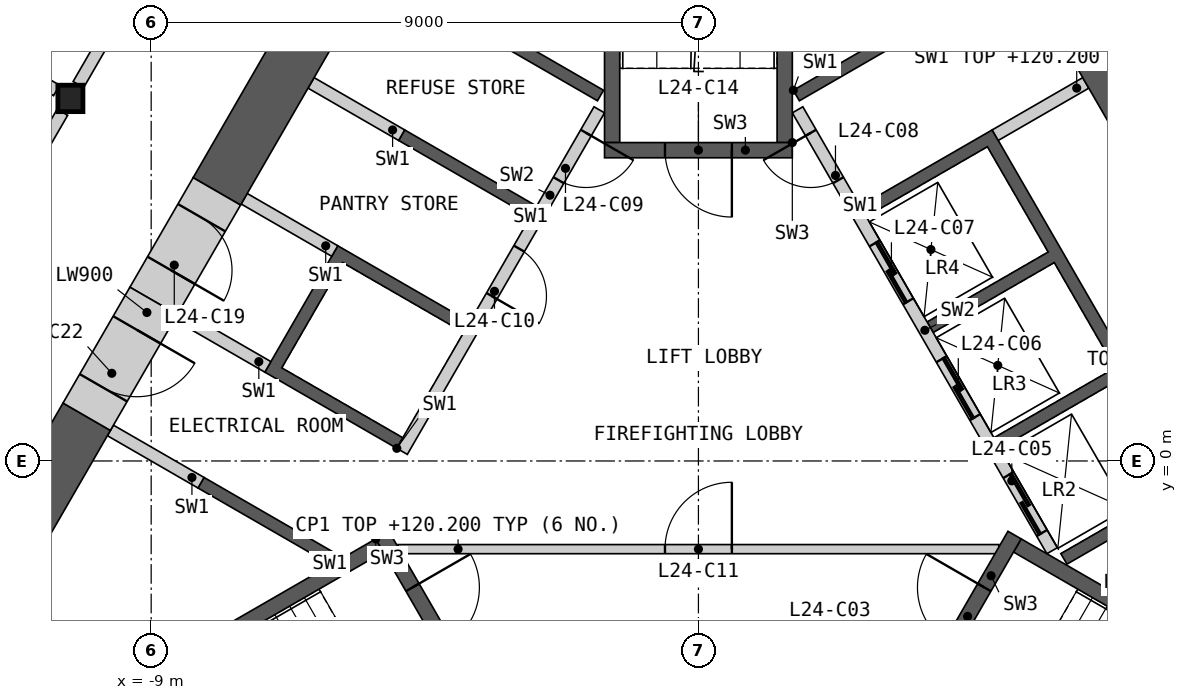
"""IFC4 building model, lengths in metres.
Left out: names, types, materials, properties, quantities, classifications, styles, units other than length and angle.
Written with IfcOpenShell. Run it as: python <this file> out.ifc"""

import sys

from ifc_helpers import new_model, si_unit, direction, frame, frame_2d, origin, origin_2d, place, context, subcontext, project, spatial, polyline, rectangle, i_section, outline, extrude, element, fill, save


model = new_model("IFC4")
c1 = context("Model", 3, precision=1e-05, world=origin(), true_north=direction((0.0, 1.0)))
c2 = subcontext(c1, "Body", "Model", "MODEL_VIEW")
j1 = project(units=[si_unit("LENGTHUNIT", "METRE"), si_unit("PLANEANGLEUNIT", "RADIAN")], contexts=[c1])
p1 = place(None, origin())
s1 = spatial("IfcSite", under=j1, at=p1, CompositionType="ELEMENT")
p2 = place(p1, origin())
s2 = spatial("IfcBuilding", under=s1, at=p2, CompositionType="ELEMENT")
p3 = place(p2, frame((0.0, 0.0, 116.4)))
s3 = spatial("IfcBuildingStorey", under=s2, at=p3, CompositionType="ELEMENT", Elevation=116.4)
p4 = place(p3, frame((-10.328, 5.963, 0.0), z_axis=(0.0, 0.0, 1.0), x_axis=(1.0, 0.0, 0.0)))
e1 = element("IfcColumn", 1, at=p4, inside=s3, PredefinedType="COLUMN", context=c2, shape_type="SweptSolid", body=[
    extrude(i_section(OverallWidth=0.412, OverallDepth=0.435, WebThickness=0.036, FlangeThickness=0.057, at=origin_2d()), origin(), (0.0, 0.0, 1.0), 4.2),
])
p5 = place(p3, origin())
e2 = element("IfcWall", 2, at=p5, inside=s3, PredefinedType="SHEAR", context=c2, shape_type="SweptSolid", body=[
    extrude(outline(polyline([(1.561, 6.097), (3.731, 7.35), (3.831, 7.177), (1.66, 5.924), (1.561, 6.097)])), origin(), (0.0, 0.0, 1.0), 3.8),
])
p6 = place(p3, origin())
e3 = element("IfcWall", 3, at=p6, inside=s3, PredefinedType="SHEAR", context=c2, shape_type="SweptSolid", body=[
    extrude(outline(polyline([(2.66, 4.192), (4.831, 5.445), (8.231, -0.444), (6.061, -1.697), (5.96, -1.524), (7.952, -0.374), (6.952, 1.358), (4.96, 0.208), (4.861, 0.381), (6.852, 1.531), (5.852, 3.263), (3.861, 2.113), (3.76, 2.287), (5.752, 3.437), (4.752, 5.169), (2.76, 4.019), (2.66, 4.192)])), origin(), (0.0, 0.0, 1.0), 3.8),
])
p7 = place(p3, frame((5.817, -1.476, 0.0), z_axis=(0.0, 0.0, 1.0), x_axis=(-0.500002616675, 0.866023893041, 0.0)))
e4 = element("IfcWall", 4, at=p7, inside=s3, PredefinedType="SOLIDWALL", context=c2, shape_type="SweptSolid", body=[
    extrude(rectangle(XDim=8.373, YDim=0.2, at=frame_2d((4.187, 0.0))), origin(), (0.0, 0.0, 1.0), 3.8),
])
p8 = place(p7, frame((0.337, 0.0, 0.0)))
e5 = element("IfcOpeningElement", 5, at=p8, cuts=e4, PredefinedType="OPENING", context=c2, shape_type="SweptSolid", body=[
    extrude(rectangle(XDim=1.1, YDim=2.1, at=frame_2d((0.55, 1.05))), frame((0.0, 0.11, 0.0), z_axis=(0.0, -1.0, 0.0), x_axis=(1.0, 0.0, 0.0)), (0.0, 0.0, 1.0), 0.22),
])
p9 = place(p7, frame((2.537, 0.0, 0.0)))
e6 = element("IfcOpeningElement", 6, at=p9, cuts=e4, PredefinedType="OPENING", context=c2, shape_type="SweptSolid", body=[
    extrude(rectangle(XDim=1.1, YDim=2.1, at=frame_2d((0.55, 1.05))), frame((0.0, 0.11, 0.0), z_axis=(0.0, -1.0, 0.0), x_axis=(1.0, 0.0, 0.0)), (0.0, 0.0, 1.0), 0.22),
])
p10 = place(p7, frame((4.737, 0.0, 0.0)))
e7 = element("IfcOpeningElement", 7, at=p10, cuts=e4, PredefinedType="OPENING", context=c2, shape_type="SweptSolid", body=[
    extrude(rectangle(XDim=1.1, YDim=2.1, at=frame_2d((0.55, 1.05))), frame((0.0, 0.11, 0.0), z_axis=(0.0, -1.0, 0.0), x_axis=(1.0, 0.0, 0.0)), (0.0, 0.0, 1.0), 0.22),
])
p11 = place(p7, frame((7.037, 0.0, 0.0)))
e8 = element("IfcOpeningElement", 8, at=p11, cuts=e4, PredefinedType="OPENING", context=c2, shape_type="SweptSolid", body=[
    extrude(rectangle(XDim=0.9, YDim=2.1, at=frame_2d((0.45, 1.05))), frame((0.0, 0.11, 0.0), z_axis=(0.0, -1.0, 0.0), x_axis=(1.0, 0.0, 0.0)), (0.0, 0.0, 1.0), 0.22),
])
p12 = place(p3, frame((4.881, 5.358, 0.0), z_axis=(0.0, 0.0, 1.0), x_axis=(0.866024871741, 0.500000921525, 0.0)))
e9 = element("IfcWall", 9, at=p12, inside=s3, PredefinedType="SHEAR", context=c2, shape_type="SweptSolid", body=[
    extrude(rectangle(XDim=1.72, YDim=0.2, at=frame_2d((0.86, 0.0))), origin(), (0.0, 0.0, 1.0), 3.8),
])
p13 = place(p3, origin())
e10 = element("IfcWall", 10, at=p13, inside=s3, PredefinedType="SHEAR", context=c2, shape_type="SweptSolid", body=[
    extrude(outline(polyline([(-6.061, -1.697), (-8.231, -0.444), (-8.131, -0.271), (-5.96, -1.524), (-6.061, -1.697)])), origin(), (0.0, 0.0, 1.0), 3.8),
])
p14 = place(p3, origin())
e11 = element("IfcWall", 11, at=p14, inside=s3, PredefinedType="SHEAR", context=c2, shape_type="SweptSolid", body=[
    extrude(outline(polyline([(-4.96, 0.208), (-7.131, 1.461), (-5.931, 3.54), (-3.76, 2.287), (-3.861, 2.113), (-5.852, 3.263), (-6.852, 1.531), (-4.861, 0.381), (-4.96, 0.208)])), origin(), (0.0, 0.0, 1.0), 3.8),
])
p15 = place(p3, origin())
e12 = element("IfcWall", 12, at=p15, inside=s3, PredefinedType="SHEAR", context=c2, shape_type="SweptSolid", body=[
    extrude(outline(polyline([(-2.76, 4.019), (-4.931, 5.272), (-4.831, 5.445), (-2.66, 4.192), (-2.76, 4.019)])), origin(), (0.0, 0.0, 1.0), 3.8),
])
p16 = place(p3, origin())
e13 = element("IfcWall", 13, at=p16, inside=s3, PredefinedType="SHEAR", context=c2, shape_type="SweptSolid", body=[
    extrude(outline(polyline([(-3.731, 7.35), (-1.561, 6.097), (-1.66, 5.924), (-3.831, 7.177), (-3.731, 7.35)])), origin(), (0.0, 0.0, 1.0), 3.8),
])
p17 = place(p3, frame((-1.631, 5.776, 0.0), z_axis=(0.0, 0.0, 1.0), x_axis=(-0.499992876559, -0.866029516466, 0.0)))
e14 = element("IfcWall", 14, at=p17, inside=s3, PredefinedType="SOLIDWALL", context=c2, shape_type="SweptSolid", body=[
    extrude(rectangle(XDim=6.486, YDim=0.2, at=frame_2d((3.243, 0.0))), origin(), (0.0, 0.0, 1.0), 3.8),
])
p18 = place(p17, frame((0.437, 0.0, 0.0)))
e15 = element("IfcOpeningElement", 15, at=p18, cuts=e14, PredefinedType="OPENING", context=c2, shape_type="SweptSolid", body=[
    extrude(rectangle(XDim=0.9, YDim=2.1, at=frame_2d((0.45, 1.05))), frame((0.0, 0.11, 0.0), z_axis=(0.0, -1.0, 0.0), x_axis=(1.0, 0.0, 0.0)), (0.0, 0.0, 1.0), 0.22),
])
p19 = place(p17, frame((2.637, 0.0, 0.0)))
e16 = element("IfcOpeningElement", 16, at=p19, cuts=e14, PredefinedType="OPENING", context=c2, shape_type="SweptSolid", body=[
    extrude(rectangle(XDim=0.9, YDim=2.1, at=frame_2d((0.45, 1.05))), frame((0.0, 0.11, 0.0), z_axis=(0.0, -1.0, 0.0), x_axis=(1.0, 0.0, 0.0)), (0.0, 0.0, 1.0), 0.22),
])
p20 = place(p3, frame((-4.881, 5.358, 0.0), z_axis=(0.0, 0.0, 1.0), x_axis=(-0.866024871741, 0.500000921525, 0.0)))
e17 = element("IfcWall", 17, at=p20, inside=s3, PredefinedType="SHEAR", context=c2, shape_type="SweptSolid", body=[
    extrude(rectangle(XDim=1.72, YDim=0.2, at=frame_2d((0.86, 0.0))), origin(), (0.0, 0.0, 1.0), 3.8),
])
p21 = place(p3, frame((-5.981, 3.453, 0.0), z_axis=(0.0, 0.0, 1.0), x_axis=(-0.866060346521, 0.499939472521, 0.0)))
e18 = element("IfcWall", 18, at=p21, inside=s3, PredefinedType="SHEAR", context=c2, shape_type="SweptSolid", body=[
    extrude(rectangle(XDim=1.72, YDim=0.2, at=frame_2d((0.86, 0.0))), origin(), (0.0, 0.0, 1.0), 3.8),
])
for number, where, z_axis, x_axis in (
    (19, (-7.081, 1.548, 0.0), (0.0, 0.0, 1.0), (-0.866, 0.5, 0.0)),
    (20, (-8.181, -0.357, 0.0), (0.0, 0.0, 1.0), (-0.866, 0.5, 0.0)),
):
    element("IfcWall", number, at=place(p3, frame(where, z_axis=z_axis, x_axis=x_axis)), inside=s3, PredefinedType="SHEAR", context=c2, shape_type="SweptSolid", body=[
        extrude(rectangle(XDim=1.72, YDim=0.2, at=frame_2d((0.86, 0.0))), origin(), (0.0, 0.0, 1.0), 3.8),
    ])
p22 = place(p3, frame((-4.941, -1.45, 0.0), z_axis=(0.0, 0.0, 1.0), x_axis=(1.0, 0.0, 0.0)))
e21 = element("IfcWall", 21, at=p22, inside=s3, PredefinedType="PARTITIONING", context=c2, shape_type="SweptSolid", body=[
    extrude(rectangle(XDim=9.882, YDim=0.15, at=frame_2d((4.941, 0.0))), origin(), (0.0, 0.0, 1.0), 3.8),
])
p23 = place(p22, frame((4.391, 0.0, 0.0)))
e22 = element("IfcOpeningElement", 22, at=p23, cuts=e21, PredefinedType="OPENING", context=c2, shape_type="SweptSolid", body=[
    extrude(rectangle(XDim=1.1, YDim=2.1, at=frame_2d((0.55, 1.05))), frame((0.0, 0.085, 0.0), z_axis=(0.0, -1.0, 0.0), x_axis=(1.0, 0.0, 0.0)), (0.0, 0.0, 1.0), 0.17),
])
p24 = place(p3, origin())
e23 = element("IfcWall", 23, at=p24, inside=s3, PredefinedType="SHEAR", context=c2, shape_type="SweptSolid", body=[
    extrude(outline(polyline([(-5.307, -1.281), (-10.374, -4.206), (-10.032, -4.298), (-5.182, -1.498), (-5.307, -1.281)])), origin(), (0.0, 0.0, 1.0), 3.8),
])
p25 = place(p3, frame((-5.199, -1.219, 0.0), z_axis=(0.0, 0.0, 1.0), x_axis=(0.499982516597, -0.866035497597, 0.0)))
e24 = element("IfcWall", 24, at=p25, inside=s3, PredefinedType="SHEAR", context=c2, shape_type="SweptSolid", body=[
    extrude(rectangle(XDim=3.088, YDim=0.25, at=frame_2d((1.544, 0.0))), origin(), (0.0, 0.0, 1.0), 3.8),
])
p26 = place(p25, frame((0.994, 0.0, 0.0)))
e25 = element("IfcOpeningElement", 25, at=p26, cuts=e24, PredefinedType="OPENING", context=c2, shape_type="SweptSolid", body=[
    extrude(rectangle(XDim=1.1, YDim=2.1, at=frame_2d((0.55, 1.05))), frame((0.0, 0.135, 0.0), z_axis=(0.0, -1.0, 0.0), x_axis=(1.0, 0.0, 0.0)), (0.0, 0.0, 1.0), 0.27),
])
p27 = place(p3, origin())
e26 = element("IfcWall", 26, at=p27, inside=s3, PredefinedType="SHEAR", context=c2, shape_type="SweptSolid", body=[
    extrude(outline(polyline([(10.032, -4.298), (10.374, -4.206), (5.307, -1.281), (5.182, -1.498), (10.032, -4.298)])), origin(), (0.0, 0.0, 1.0), 3.8),
])
p28 = place(p3, frame((3.655, -3.893, 0.0), z_axis=(0.0, 0.0, 1.0), x_axis=(0.499982516597, 0.866035497597, 0.0)))
e27 = element("IfcWall", 27, at=p28, inside=s3, PredefinedType="SHEAR", context=c2, shape_type="SweptSolid", body=[
    extrude(rectangle(XDim=3.088, YDim=0.25, at=frame_2d((1.544, 0.0))), origin(), (0.0, 0.0, 1.0), 3.8),
])
p29 = place(p28, frame((0.994, 0.0, 0.0)))
e28 = element("IfcOpeningElement", 28, at=p29, cuts=e27, PredefinedType="OPENING", context=c2, shape_type="SweptSolid", body=[
    extrude(rectangle(XDim=1.1, YDim=2.1, at=frame_2d((0.55, 1.05))), frame((0.0, 0.135, 0.0), z_axis=(0.0, -1.0, 0.0), x_axis=(1.0, 0.0, 0.0)), (0.0, 0.0, 1.0), 0.27),
])
p30 = place(p3, origin())
e29 = element("IfcWall", 29, at=p30, inside=s3, PredefinedType="SHEAR", context=c2, shape_type="SweptSolid", body=[
    extrude(outline(polyline([(1.544, 5.237), (1.544, 11.087), (1.294, 10.837), (1.294, 5.237), (1.544, 5.237)])), origin(), (0.0, 0.0, 1.0), 3.8),
])
p31 = place(p3, origin())
e30 = element("IfcWall", 30, at=p31, inside=s3, PredefinedType="SHEAR", context=c2, shape_type="SweptSolid", body=[
    extrude(outline(polyline([(-1.294, 10.837), (-1.544, 11.087), (-1.544, 5.237), (-1.294, 5.237), (-1.294, 10.837)])), origin(), (0.0, 0.0, 1.0), 3.8),
])
p32 = place(p3, frame((1.544, 5.112, 0.0), z_axis=(0.0, 0.0, 1.0), x_axis=(-1.0, 0.0, 0.0)))
e31 = element("IfcWall", 31, at=p32, inside=s3, PredefinedType="SHEAR", context=c2, shape_type="SweptSolid", body=[
    extrude(rectangle(XDim=3.088, YDim=0.25, at=frame_2d((1.544, 0.0))), origin(), (0.0, 0.0, 1.0), 3.8),
])
p33 = place(p32, frame((0.994, 0.0, 0.0)))
e32 = element("IfcOpeningElement", 32, at=p33, cuts=e31, PredefinedType="OPENING", context=c2, shape_type="SweptSolid", body=[
    extrude(rectangle(XDim=1.1, YDim=2.1, at=frame_2d((0.55, 1.05))), frame((0.0, 0.135, 0.0), z_axis=(0.0, -1.0, 0.0), x_axis=(1.0, 0.0, 0.0)), (0.0, 0.0, 1.0), 0.27),
])
p34 = place(p3, frame((7.91, 4.451, 0.0), z_axis=(0.0, 0.0, 1.0), x_axis=(-0.500005799286, 0.866022055539, 0.0)))
e33 = element("IfcWall", 33, at=p34, inside=s3, PredefinedType="SHEAR", context=c2, shape_type="SweptSolid", body=[
    extrude(rectangle(XDim=15.041, YDim=0.9, at=frame_2d((7.521, 0.0))), origin(), (0.0, 0.0, 1.0), 3.8),
])
p35 = place(p3, frame((-3.55, 12.004, 0.0), z_axis=(0.0, 0.0, 1.0), x_axis=(-0.499993245289, -0.866029303583, 0.0)))
e34 = element("IfcWall", 34, at=p35, inside=s3, PredefinedType="SHEAR", context=c2, shape_type="SweptSolid", body=[
    extrude(rectangle(XDim=8.741, YDim=0.9, at=frame_2d((4.37, 0.0))), origin(), (0.0, 0.0, 1.0), 3.8),
])
p36 = place(p3, frame((-10.06, 0.728, 0.0), z_axis=(0.0, 0.0, 1.0), x_axis=(-0.500021220092, -0.866013152012, 0.0)))
e35 = element("IfcWall", 35, at=p36, inside=s3, PredefinedType="SHEAR", context=c2, shape_type="SweptSolid", body=[
    extrude(rectangle(XDim=4.22, YDim=0.9, at=frame_2d((2.11, 0.0))), origin(), (0.0, 0.0, 1.0), 3.8),
])
p37 = place(p3, frame((-7.92, 4.434, 0.0), z_axis=(0.0, 0.0, 1.0), x_axis=(-0.499939227269, -0.866060488094, 0.0)))
e36 = element("IfcWall", 36, at=p37, inside=s3, PredefinedType="SHEAR", context=c2, shape_type="SweptSolid", body=[
    extrude(rectangle(XDim=2.08, YDim=0.9, at=frame_2d((1.04, 0.0))), origin(), (0.0, 0.0, 1.0), 3.8),
])
p38 = place(p37, frame((0.5, 0.0, 0.0)))
e37 = element("IfcOpeningElement", 37, at=p38, cuts=e36, PredefinedType="OPENING", context=c2, shape_type="SweptSolid", body=[
    extrude(rectangle(XDim=1.0, YDim=2.1, at=frame_2d((0.5, 1.05))), frame((0.0, 0.46, 0.0), z_axis=(0.0, -1.0, 0.0), x_axis=(1.0, 0.0, 0.0)), (0.0, 0.0, 1.0), 0.92),
])
p39 = place(p3, frame((-8.96, 2.633, 0.0), z_axis=(0.0, 0.0, 1.0), x_axis=(-0.50002983664, -0.866008176907, 0.0)))
e38 = element("IfcWall", 38, at=p39, inside=s3, PredefinedType="SHEAR", context=c2, shape_type="SweptSolid", body=[
    extrude(rectangle(XDim=2.2, YDim=0.9, at=frame_2d((1.1, 0.0))), origin(), (0.0, 0.0, 1.0), 3.8),
])
p40 = place(p39, frame((0.55, 0.0, 0.0)))
e39 = element("IfcOpeningElement", 39, at=p40, cuts=e38, PredefinedType="OPENING", context=c2, shape_type="SweptSolid", body=[
    extrude(rectangle(XDim=1.1, YDim=2.1, at=frame_2d((0.55, 1.05))), frame((0.0, 0.46, 0.0), z_axis=(0.0, -1.0, 0.0), x_axis=(1.0, 0.0, 0.0)), (0.0, 0.0, 1.0), 0.92),
])
p41 = place(p3, frame((-10.197, 6.19, 0.0), z_axis=(0.0, 0.0, 1.0), x_axis=(0.500012035596, 0.866018454918, 0.0)))
e40 = element("IfcWall", 40, at=p41, inside=s3, PredefinedType="PARTITIONING", context=c2, shape_type="SweptSolid", body=[
    extrude(rectangle(XDim=9.803, YDim=0.2, at=frame_2d((4.902, 0.0))), origin(), (0.0, 0.0, 1.0), 3.8),
])
p42 = place(p41, frame((1.851, 0.0, 0.0)))
e41 = element("IfcOpeningElement", 41, at=p42, cuts=e40, PredefinedType="OPENING", context=c2, shape_type="SweptSolid", body=[
    extrude(rectangle(XDim=1.0, YDim=2.1, at=frame_2d((0.5, 1.05))), frame((0.0, 0.11, 0.0), z_axis=(0.0, -1.0, 0.0), x_axis=(1.0, 0.0, 0.0)), (0.0, 0.0, 1.0), 0.22),
])
p43 = place(p3, frame((5.295, 14.68, 0.0), z_axis=(0.0, 0.0, 1.0), x_axis=(0.500012035596, -0.866018454918, 0.0)))
e42 = element("IfcWall", 42, at=p43, inside=s3, PredefinedType="PARTITIONING", context=c2, shape_type="SweptSolid", body=[
    extrude(rectangle(XDim=9.803, YDim=0.2, at=frame_2d((4.902, 0.0))), origin(), (0.0, 0.0, 1.0), 3.8),
])
p44 = place(p43, frame((4.376, 0.0, 0.0)))
e43 = element("IfcOpeningElement", 43, at=p44, cuts=e42, PredefinedType="OPENING", context=c2, shape_type="SweptSolid", body=[
    extrude(rectangle(XDim=0.95, YDim=2.1, at=frame_2d((0.475, 1.05))), frame((0.0, 0.11, 0.0), z_axis=(0.0, -1.0, 0.0), x_axis=(1.0, 0.0, 0.0)), (0.0, 0.0, 1.0), 0.22),
])
p45 = place(p3, frame((-15.402, -2.823, 0.0), z_axis=(0.0, 0.0, 1.0), x_axis=(0.500023237168, 0.866011987384, 0.0)))
e44 = element("IfcWall", 44, at=p45, inside=s3, PredefinedType="PARTITIONING", context=c2, shape_type="SweptSolid", body=[
    extrude(rectangle(XDim=9.883, YDim=0.2, at=frame_2d((4.942, 0.0))), origin(), (0.0, 0.0, 1.0), 3.8),
])
p46 = place(p45, frame((4.492, 0.0, 0.0)))
e45 = element("IfcOpeningElement", 45, at=p46, cuts=e44, PredefinedType="OPENING", context=c2, shape_type="SweptSolid", body=[
    extrude(rectangle(XDim=1.0, YDim=2.1, at=frame_2d((0.5, 1.05))), frame((0.0, 0.11, 0.0), z_axis=(0.0, -1.0, 0.0), x_axis=(1.0, 0.0, 0.0)), (0.0, 0.0, 1.0), 0.22),
])
p47 = place(p3, frame((-21.536, 12.434, 0.0), z_axis=(0.0, 0.0, 1.0), x_axis=(0.86602461759, -0.500001361726, 0.0)))
e46 = element("IfcWall", 46, at=p47, inside=s3, PredefinedType="PARTITIONING", context=c2, shape_type="SweptSolid", body=[
    extrude(rectangle(XDim=12.679, YDim=0.2, at=frame_2d((6.34, 0.0))), origin(), (0.0, 0.0, 1.0), 2.885),
])
p48 = place(p8, origin())
e47 = element("IfcDoor", 47, at=p48, inside=s3, OperationType="SLIDING_TO_LEFT", PredefinedType="DOOR", context=c2, shape_type="SweptSolid", body=[
    extrude(rectangle(XDim=1.1, YDim=2.1, at=frame_2d((0.55, 1.05))), frame((0.0, 0.025, 0.0), z_axis=(0.0, -1.0, 0.0), x_axis=(1.0, 0.0, 0.0)), (0.0, 0.0, 1.0), 0.05),
])
fill(e5, e47)
p49 = place(p9, origin())
e48 = element("IfcDoor", 48, at=p49, inside=s3, OperationType="SLIDING_TO_LEFT", PredefinedType="DOOR", context=c2, shape_type="SweptSolid", body=[
    extrude(rectangle(XDim=1.1, YDim=2.1, at=frame_2d((0.55, 1.05))), frame((0.0, 0.025, 0.0), z_axis=(0.0, -1.0, 0.0), x_axis=(1.0, 0.0, 0.0)), (0.0, 0.0, 1.0), 0.05),
])
fill(e6, e48)
p50 = place(p10, origin())
e49 = element("IfcDoor", 49, at=p50, inside=s3, OperationType="SLIDING_TO_LEFT", PredefinedType="DOOR", context=c2, shape_type="SweptSolid", body=[
    extrude(rectangle(XDim=1.1, YDim=2.1, at=frame_2d((0.55, 1.05))), frame((0.0, 0.025, 0.0), z_axis=(0.0, -1.0, 0.0), x_axis=(1.0, 0.0, 0.0)), (0.0, 0.0, 1.0), 0.05),
])
fill(e7, e49)
p51 = place(p11, origin())
e50 = element("IfcDoor", 50, at=p51, inside=s3, OperationType="SINGLE_SWING_RIGHT", PredefinedType="DOOR", context=c2, shape_type="SweptSolid", body=[
    extrude(rectangle(XDim=0.9, YDim=2.1, at=frame_2d((0.45, 1.05))), frame((0.0, 0.025, 0.0), z_axis=(0.0, -1.0, 0.0), x_axis=(1.0, 0.0, 0.0)), (0.0, 0.0, 1.0), 0.05),
])
fill(e8, e50)
p52 = place(p18, origin())
e51 = element("IfcDoor", 51, at=p52, inside=s3, OperationType="SINGLE_SWING_LEFT", PredefinedType="DOOR", context=c2, shape_type="SweptSolid", body=[
    extrude(rectangle(XDim=0.9, YDim=2.1, at=frame_2d((0.45, 1.05))), frame((0.0, 0.025, 0.0), z_axis=(0.0, -1.0, 0.0), x_axis=(1.0, 0.0, 0.0)), (0.0, 0.0, 1.0), 0.05),
])
fill(e15, e51)
p53 = place(p19, origin())
e52 = element("IfcDoor", 52, at=p53, inside=s3, OperationType="SINGLE_SWING_RIGHT", PredefinedType="DOOR", context=c2, shape_type="SweptSolid", body=[
    extrude(rectangle(XDim=0.9, YDim=2.1, at=frame_2d((0.45, 1.05))), frame((0.0, 0.025, 0.0), z_axis=(0.0, -1.0, 0.0), x_axis=(1.0, 0.0, 0.0)), (0.0, 0.0, 1.0), 0.05),
])
fill(e16, e52)
p54 = place(p23, origin())
e53 = element("IfcDoor", 53, at=p54, inside=s3, OperationType="SINGLE_SWING_RIGHT", PredefinedType="DOOR", context=c2, shape_type="SweptSolid", body=[
    extrude(rectangle(XDim=1.1, YDim=2.1, at=frame_2d((0.55, 1.05))), frame((0.0, 0.025, 0.0), z_axis=(0.0, -1.0, 0.0), x_axis=(1.0, 0.0, 0.0)), (0.0, 0.0, 1.0), 0.05),
])
fill(e22, e53)
p55 = place(p26, origin())
e54 = element("IfcDoor", 54, at=p55, inside=s3, OperationType="SINGLE_SWING_LEFT", PredefinedType="DOOR", context=c2, shape_type="SweptSolid", body=[
    extrude(rectangle(XDim=1.1, YDim=2.1, at=frame_2d((0.55, 1.05))), frame((0.0, 0.025, 0.0), z_axis=(0.0, -1.0, 0.0), x_axis=(1.0, 0.0, 0.0)), (0.0, 0.0, 1.0), 0.05),
])
fill(e25, e54)
p56 = place(p29, origin())
e55 = element("IfcDoor", 55, at=p56, inside=s3, OperationType="SINGLE_SWING_RIGHT", PredefinedType="DOOR", context=c2, shape_type="SweptSolid", body=[
    extrude(rectangle(XDim=1.1, YDim=2.1, at=frame_2d((0.55, 1.05))), frame((0.0, 0.025, 0.0), z_axis=(0.0, -1.0, 0.0), x_axis=(1.0, 0.0, 0.0)), (0.0, 0.0, 1.0), 0.05),
])
fill(e28, e55)
p57 = place(p33, origin())
e56 = element("IfcDoor", 56, at=p57, inside=s3, OperationType="SINGLE_SWING_LEFT", PredefinedType="DOOR", context=c2, shape_type="SweptSolid", body=[
    extrude(rectangle(XDim=1.1, YDim=2.1, at=frame_2d((0.55, 1.05))), frame((0.0, 0.025, 0.0), z_axis=(0.0, -1.0, 0.0), x_axis=(1.0, 0.0, 0.0)), (0.0, 0.0, 1.0), 0.05),
])
fill(e32, e56)
p58 = place(p38, origin())
e57 = element("IfcDoor", 57, at=p58, inside=s3, OperationType="SINGLE_SWING_RIGHT", PredefinedType="DOOR", context=c2, shape_type="SweptSolid", body=[
    extrude(rectangle(XDim=1.0, YDim=2.1, at=frame_2d((0.5, 1.05))), frame((0.0, 0.205, 0.0), z_axis=(0.0, -1.0, 0.0), x_axis=(1.0, 0.0, 0.0)), (0.0, 0.0, 1.0), 0.05),
])
fill(e37, e57)
p59 = place(p40, origin())
e58 = element("IfcDoor", 58, at=p59, inside=s3, OperationType="SINGLE_SWING_LEFT", PredefinedType="DOOR", context=c2, shape_type="SweptSolid", body=[
    extrude(rectangle(XDim=1.1, YDim=2.1, at=frame_2d((0.55, 1.05))), frame((0.0, 0.205, 0.0), z_axis=(0.0, -1.0, 0.0), x_axis=(1.0, 0.0, 0.0)), (0.0, 0.0, 1.0), 0.05),
])
fill(e39, e58)
save(model, sys.argv[1])
